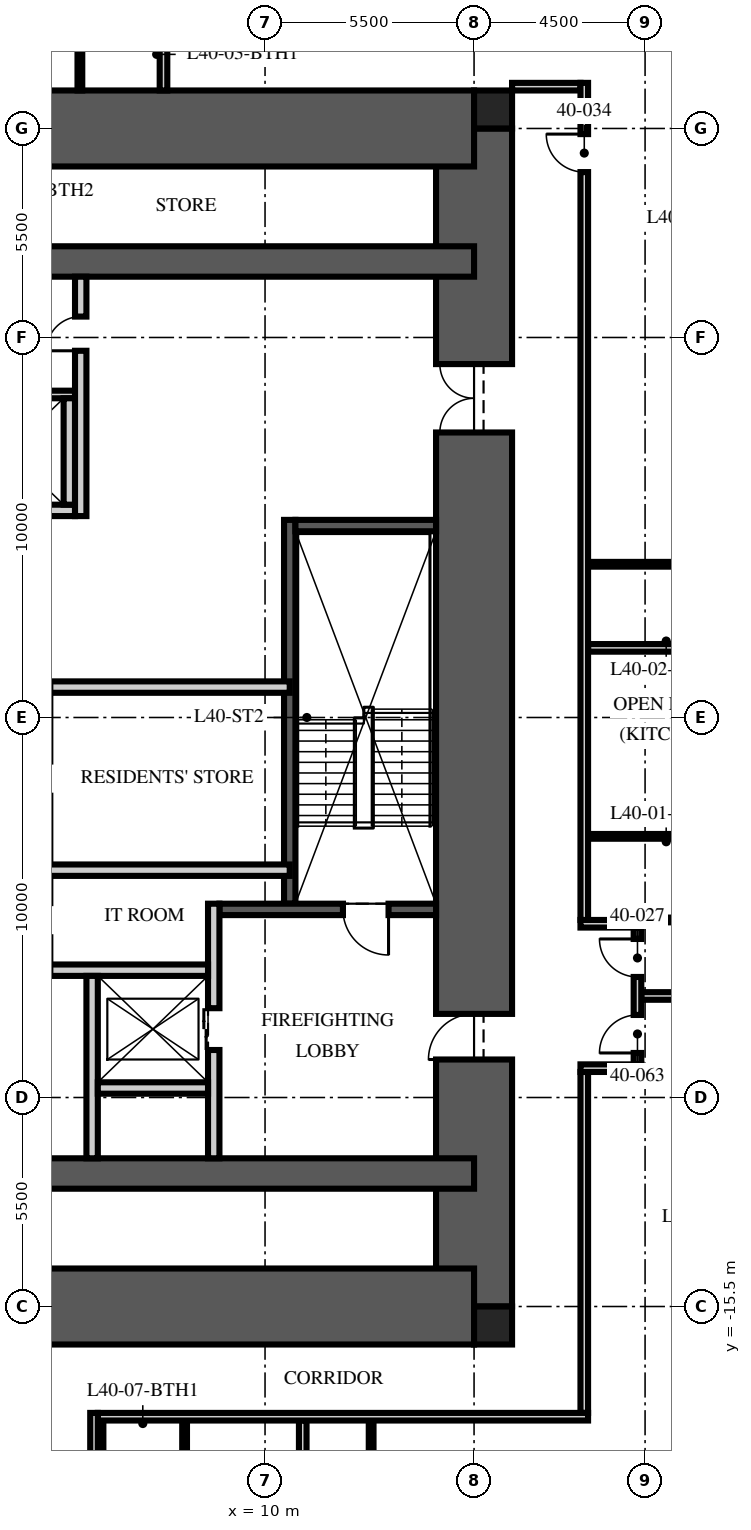
"""IFC4 building model, lengths in metres.
Left out: names, types, materials, properties, quantities, classifications, styles, units other than length and angle.
Written with IfcOpenShell. Run it as: python <this file> out.ifc"""

import sys

from ifc_helpers import new_model, si_unit, direction, frame, frame_2d, origin, origin_2d, place, context, subcontext, project, spatial, rectangle, extrude, element, fill, save


model = new_model("IFC4")
c1 = context("Model", 3, precision=1e-05, world=origin(), true_north=direction((0.0, 1.0)))
c2 = subcontext(c1, "Body", "Model", "MODEL_VIEW")
j1 = project(units=[si_unit("LENGTHUNIT", "METRE"), si_unit("PLANEANGLEUNIT", "RADIAN")], contexts=[c1])
p1 = place(None, origin())
s1 = spatial("IfcSite", under=j1, at=p1, CompositionType="ELEMENT")
p2 = place(p1, origin())
s2 = spatial("IfcBuilding", under=s1, at=p2, CompositionType="ELEMENT")
p3 = place(p2, frame((0.0, 0.0, 159.75)))
s3 = spatial("IfcBuildingStorey", under=s2, at=p3, CompositionType="ELEMENT", Elevation=159.75)
p4 = place(p3, frame((15.5, -15.5, -0.25), z_axis=(0.0, 0.0, 1.0), x_axis=(0.0, 1.0, 0.0)))
e1 = element("IfcWall", 1, at=p4, inside=s3, PredefinedType="SHEAR", context=c2, shape_type="SweptSolid", body=[
    extrude(rectangle(XDim=31.0, YDim=2.0, at=frame_2d((15.5, 0.0))), origin(), (0.0, 0.0, 1.0), 3.75),
])
p5 = place(p4, frame((6.5, 0.0, 0.25)))
e2 = element("IfcOpeningElement", 2, at=p5, cuts=e1, PredefinedType="OPENING", context=c2, shape_type="SweptSolid", body=[
    extrude(rectangle(XDim=1.2, YDim=2.1, at=frame_2d((0.6, 1.05))), frame((0.0, 1.01, 0.0), z_axis=(0.0, -1.0, 0.0), x_axis=(1.0, 0.0, 0.0)), (0.0, 0.0, 1.0), 2.02),
])
p6 = place(p4, frame((23.0, 0.0, 0.25)))
e3 = element("IfcOpeningElement", 3, at=p6, cuts=e1, PredefinedType="OPENING", context=c2, shape_type="SweptSolid", body=[
    extrude(rectangle(XDim=1.8, YDim=2.1, at=frame_2d((0.9, 1.05))), frame((0.0, 1.01, 0.0), z_axis=(0.0, -1.0, 0.0), x_axis=(1.0, 0.0, 0.0)), (0.0, 0.0, 1.0), 2.02),
])
p7 = place(p3, frame((-15.5, 15.5, -0.25), z_axis=(0.0, 0.0, 1.0), x_axis=(1.0, 0.0, 0.0)))
e4 = element("IfcWall", 4, at=p7, inside=s3, PredefinedType="SHEAR", context=c2, shape_type="SweptSolid", body=[
    extrude(rectangle(XDim=31.0, YDim=2.0, at=frame_2d((15.5, 0.0))), origin(), (0.0, 0.0, 1.0), 3.75),
])
p8 = place(p7, frame((5.0, 0.0, 0.25)))
e5 = element("IfcOpeningElement", 5, at=p8, cuts=e4, PredefinedType="OPENING", context=c2, shape_type="SweptSolid", body=[
    extrude(rectangle(XDim=1.0, YDim=2.1, at=frame_2d((0.5, 1.05))), frame((0.0, 1.01, 0.0), z_axis=(0.0, -1.0, 0.0), x_axis=(1.0, 0.0, 0.0)), (0.0, 0.0, 1.0), 2.02),
])
p9 = place(p3, frame((-15.5, -15.5, -0.25), z_axis=(0.0, 0.0, 1.0), x_axis=(1.0, 0.0, 0.0)))
e6 = element("IfcWall", 6, at=p9, inside=s3, PredefinedType="SHEAR", context=c2, shape_type="SweptSolid", body=[
    extrude(rectangle(XDim=31.0, YDim=2.0, at=frame_2d((15.5, 0.0))), origin(), (0.0, 0.0, 1.0), 3.75),
])
p10 = place(p9, frame((10.4, 0.0, 0.25)))
e7 = element("IfcOpeningElement", 7, at=p10, cuts=e6, PredefinedType="OPENING", context=c2, shape_type="SweptSolid", body=[
    extrude(rectangle(XDim=1.1, YDim=2.1, at=frame_2d((0.55, 1.05))), frame((0.0, 1.01, 0.0), z_axis=(0.0, -1.0, 0.0), x_axis=(1.0, 0.0, 0.0)), (0.0, 0.0, 1.0), 2.02),
])
p11 = place(p9, frame((13.5, 0.0, 0.25)))
e8 = element("IfcOpeningElement", 8, at=p11, cuts=e6, PredefinedType="OPENING", context=c2, shape_type="SweptSolid", body=[
    extrude(rectangle(XDim=1.1, YDim=2.1, at=frame_2d((0.55, 1.05))), frame((0.0, 1.01, 0.0), z_axis=(0.0, -1.0, 0.0), x_axis=(1.0, 0.0, 0.0)), (0.0, 0.0, 1.0), 2.02),
])
p12 = place(p9, frame((16.6, 0.0, 0.25)))
e9 = element("IfcOpeningElement", 9, at=p12, cuts=e6, PredefinedType="OPENING", context=c2, shape_type="SweptSolid", body=[
    extrude(rectangle(XDim=1.1, YDim=2.1, at=frame_2d((0.55, 1.05))), frame((0.0, 1.01, 0.0), z_axis=(0.0, -1.0, 0.0), x_axis=(1.0, 0.0, 0.0)), (0.0, 0.0, 1.0), 2.02),
])
for number, where, z_axis, x_axis in (
    (10, (-15.5, 12.0, -0.25), (0.0, 0.0, 1.0), (1.0, 0.0, 0.0)),
    (11, (-15.5, -12.0, -0.25), (0.0, 0.0, 1.0), (1.0, 0.0, 0.0)),
):
    element("IfcWall", number, at=place(p3, frame(where, z_axis=z_axis, x_axis=x_axis)), inside=s3, PredefinedType="SHEAR", context=c2, shape_type="SweptSolid", body=[
        extrude(rectangle(XDim=31.0, YDim=0.8, at=frame_2d((15.5, 0.0))), origin(), (0.0, 0.0, 1.0), 3.75),
    ])
for number, where, z_axis, x_axis in (
    (12, (16.0, 16.0, -0.25), (0.0, 0.0, 1.0), (1.0, 0.0, 0.0)),
    (13, (16.0, -16.0, -0.25), (0.0, 0.0, 1.0), (1.0, 0.0, 0.0)),
):
    element("IfcColumn", number, at=place(p3, frame(where, z_axis=z_axis, x_axis=x_axis)), inside=s3, PredefinedType="COLUMN", context=c2, shape_type="SweptSolid", body=[
        extrude(rectangle(XDim=1.0, YDim=1.0, at=origin_2d()), origin(), (0.0, 0.0, 1.0), 3.75),
    ])
p13 = place(p3, frame((10.65, -4.9, 0.0), z_axis=(0.0, 0.0, 1.0), x_axis=(0.0, 1.0, 0.0)))
e14 = element("IfcWall", 14, at=p13, inside=s3, PredefinedType="SOLIDWALL", context=c2, shape_type="SweptSolid", body=[
    extrude(rectangle(XDim=10.1, YDim=0.3, at=frame_2d((5.05, 0.0))), origin(), (0.0, 0.0, 1.0), 3.5),
])
p14 = place(p3, frame((14.5, -5.05, 0.0), z_axis=(0.0, 0.0, 1.0), x_axis=(-1.0, 0.0, 0.0)))
e15 = element("IfcWall", 15, at=p14, inside=s3, PredefinedType="SOLIDWALL", context=c2, shape_type="SweptSolid", body=[
    extrude(rectangle(XDim=5.7, YDim=0.3, at=frame_2d((2.85, 0.0))), origin(), (0.0, 0.0, 1.0), 3.5),
])
p15 = place(p14, frame((1.25, 0.0, 0.0)))
e16 = element("IfcOpeningElement", 16, at=p15, cuts=e15, PredefinedType="OPENING", context=c2, shape_type="SweptSolid", body=[
    extrude(rectangle(XDim=1.2, YDim=2.1, at=frame_2d((0.6, 1.05))), frame((0.0, 0.16, 0.0), z_axis=(0.0, -1.0, 0.0), x_axis=(1.0, 0.0, 0.0)), (0.0, 0.0, 1.0), 0.32),
])
p16 = place(p3, frame((14.5, 5.05, 0.0), z_axis=(0.0, 0.0, 1.0), x_axis=(-1.0, 0.0, 0.0)))
e17 = element("IfcWall", 17, at=p16, inside=s3, PredefinedType="SOLIDWALL", context=c2, shape_type="SweptSolid", body=[
    extrude(rectangle(XDim=3.7, YDim=0.3, at=frame_2d((1.85, 0.0))), origin(), (0.0, 0.0, 1.0), 3.5),
])
p17 = place(p3, frame((8.65, -11.6, 0.0), z_axis=(0.0, 0.0, 1.0), x_axis=(0.0, 1.0, 0.0)))
e18 = element("IfcWall", 18, at=p17, inside=s3, PredefinedType="PARTITIONING", context=c2, shape_type="SweptSolid", body=[
    extrude(rectangle(XDim=6.7, YDim=0.3, at=frame_2d((3.35, 0.0))), origin(), (0.0, 0.0, 1.0), 3.5),
])
p18 = place(p17, frame((2.85, 0.0, 0.0)))
e19 = element("IfcOpeningElement", 19, at=p18, cuts=e18, PredefinedType="OPENING", context=c2, shape_type="SweptSolid", body=[
    extrude(rectangle(XDim=1.1, YDim=2.1, at=frame_2d((0.55, 1.05))), frame((0.0, 0.16, 0.0), z_axis=(0.0, -1.0, 0.0), x_axis=(1.0, 0.0, 0.0)), (0.0, 0.0, 1.0), 0.32),
])
p19 = place(p3, frame((-8.5, -6.65, 0.0), z_axis=(0.0, 0.0, 1.0), x_axis=(1.0, 0.0, 0.0)))
e20 = element("IfcWall", 20, at=p19, inside=s3, PredefinedType="PARTITIONING", context=c2, shape_type="SweptSolid", body=[
    extrude(rectangle(XDim=17.0, YDim=0.3, at=frame_2d((8.5, 0.0))), origin(), (0.0, 0.0, 1.0), 3.5),
])
p20 = place(p19, frame((7.8, 0.0, 0.0)))
e21 = element("IfcOpeningElement", 21, at=p20, cuts=e20, PredefinedType="OPENING", context=c2, shape_type="SweptSolid", body=[
    extrude(rectangle(XDim=1.3, YDim=2.4, at=frame_2d((0.65, 1.2))), frame((0.0, 0.16, 0.0), z_axis=(0.0, -1.0, 0.0), x_axis=(1.0, 0.0, 0.0)), (0.0, 0.0, 1.0), 0.32),
])
p21 = place(p19, frame((5.65, 0.0, 0.0)))
e22 = element("IfcOpeningElement", 22, at=p21, cuts=e20, PredefinedType="OPENING", context=c2, shape_type="SweptSolid", body=[
    extrude(rectangle(XDim=0.9, YDim=2.1, at=frame_2d((0.45, 1.05))), frame((0.0, 0.16, 0.0), z_axis=(0.0, -1.0, 0.0), x_axis=(1.0, 0.0, 0.0)), (0.0, 0.0, 1.0), 0.32),
])
p22 = place(p19, frame((10.4, 0.0, 0.0)))
e23 = element("IfcOpeningElement", 23, at=p22, cuts=e20, PredefinedType="OPENING", context=c2, shape_type="SweptSolid", body=[
    extrude(rectangle(XDim=0.9, YDim=2.1, at=frame_2d((0.45, 1.05))), frame((0.0, 0.16, 0.0), z_axis=(0.0, -1.0, 0.0), x_axis=(1.0, 0.0, 0.0)), (0.0, 0.0, 1.0), 0.32),
])
p23 = place(p3, frame((5.45, -11.6, 0.0), z_axis=(0.0, 0.0, 1.0), x_axis=(0.0, 1.0, 0.0)))
e24 = element("IfcWall", 24, at=p23, inside=s3, PredefinedType="PARTITIONING", context=c2, shape_type="SweptSolid", body=[
    extrude(rectangle(XDim=4.8, YDim=0.3, at=frame_2d((2.4, 0.0))), origin(), (0.0, 0.0, 1.0), 3.5),
])
p24 = place(p3, frame((5.6, -9.75, 0.0), z_axis=(0.0, 0.0, 1.0), x_axis=(1.0, 0.0, 0.0)))
e25 = element("IfcWall", 25, at=p24, inside=s3, PredefinedType="PARTITIONING", context=c2, shape_type="SweptSolid", body=[
    extrude(rectangle(XDim=2.9, YDim=0.3, at=frame_2d((1.45, 0.0))), origin(), (0.0, 0.0, 1.0), 3.5),
])
p25 = place(p3, frame((-4.7, 5.45, 0.0), z_axis=(0.0, 0.0, 1.0), x_axis=(1.0, 0.0, 0.0)))
e26 = element("IfcWall", 26, at=p25, inside=s3, PredefinedType="PARTITIONING", context=c2, shape_type="SweptSolid", body=[
    extrude(rectangle(XDim=9.7, YDim=0.3, at=frame_2d((4.85, 0.0))), origin(), (0.0, 0.0, 1.0), 3.5),
])
p26 = place(p3, frame((-4.7, 8.5, 0.0), z_axis=(0.0, 0.0, 1.0), x_axis=(1.0, 0.0, 0.0)))
e27 = element("IfcWall", 27, at=p26, inside=s3, PredefinedType="PARTITIONING", context=c2, shape_type="SweptSolid", body=[
    extrude(rectangle(XDim=9.7, YDim=0.2, at=frame_2d((4.85, 0.0))), origin(), (0.0, 0.0, 1.0), 3.5),
])
p27 = place(p3, frame((4.85, 5.6, 0.0), z_axis=(0.0, 0.0, 1.0), x_axis=(0.0, 1.0, 0.0)))
e28 = element("IfcWall", 28, at=p27, inside=s3, PredefinedType="PARTITIONING", context=c2, shape_type="SweptSolid", body=[
    extrude(rectangle(XDim=2.8, YDim=0.3, at=frame_2d((1.4, 0.0))), origin(), (0.0, 0.0, 1.0), 3.5),
])
p28 = place(p3, frame((-10.65, 0.8, 0.0), z_axis=(0.0, 0.0, 1.0), x_axis=(1.0, 0.0, 0.0)))
e29 = element("IfcWall", 29, at=p28, inside=s3, PredefinedType="PARTITIONING", context=c2, shape_type="SweptSolid", body=[
    extrude(rectangle(XDim=21.3, YDim=0.3, at=frame_2d((10.65, 0.0))), origin(), (0.0, 0.0, 1.0), 3.5),
])
p29 = place(p28, frame((10.05, 0.0, 0.0)))
e30 = element("IfcOpeningElement", 30, at=p29, cuts=e29, PredefinedType="OPENING", context=c2, shape_type="SweptSolid", body=[
    extrude(rectangle(XDim=1.2, YDim=2.1, at=frame_2d((0.6, 1.05))), frame((0.0, 0.16, 0.0), z_axis=(0.0, -1.0, 0.0), x_axis=(1.0, 0.0, 0.0)), (0.0, 0.0, 1.0), 0.32),
])
p30 = place(p28, frame((0.793, 0.0, 0.0)))
e31 = element("IfcOpeningElement", 31, at=p30, cuts=e29, PredefinedType="OPENING", context=c2, shape_type="SweptSolid", body=[
    extrude(rectangle(XDim=0.9, YDim=2.1, at=frame_2d((0.45, 1.05))), frame((0.0, 0.16, 0.0), z_axis=(0.0, -1.0, 0.0), x_axis=(1.0, 0.0, 0.0)), (0.0, 0.0, 1.0), 0.32),
])
p31 = place(p3, frame((10.65, -4.018, 0.0), z_axis=(0.0, 0.0, 1.0), x_axis=(-1.0, 0.0, 0.0)))
e32 = element("IfcWall", 32, at=p31, inside=s3, PredefinedType="PARTITIONING", context=c2, shape_type="SweptSolid", body=[
    extrude(rectangle(XDim=6.45, YDim=0.3, at=frame_2d((3.225, 0.0))), origin(), (0.0, 0.0, 1.0), 3.5),
])
p32 = place(p3, frame((5.15, 5.3, 0.0), z_axis=(0.0, 0.0, 1.0), x_axis=(0.0, 1.0, 0.0)))
e33 = element("IfcWall", 33, at=p32, inside=s3, PredefinedType="PARTITIONING", context=c2, shape_type="SweptSolid", body=[
    extrude(rectangle(XDim=6.3, YDim=0.3, at=frame_2d((3.15, 0.0))), origin(), (0.0, 0.0, 1.0), 3.5),
])
p33 = place(p32, frame((4.35, 0.0, 0.0)))
e34 = element("IfcOpeningElement", 34, at=p33, cuts=e33, PredefinedType="OPENING", context=c2, shape_type="SweptSolid", body=[
    extrude(rectangle(XDim=0.9, YDim=2.1, at=frame_2d((0.45, 1.05))), frame((0.0, 0.16, 0.0), z_axis=(0.0, -1.0, 0.0), x_axis=(1.0, 0.0, 0.0)), (0.0, 0.0, 1.0), 0.32),
])
p34 = place(p3, frame((16.5, 16.6, 0.0), z_axis=(0.0, 0.0, 1.0), x_axis=(1.0, 0.0, 0.0)))
e35 = element("IfcWall", 35, at=p34, inside=s3, PredefinedType="PARTITIONING", context=c2, shape_type="SweptSolid", body=[
    extrude(rectangle(XDim=1.8, YDim=0.2, at=frame_2d((0.9, 0.0))), origin(), (0.0, 0.0, 1.0), 2.3),
])
p35 = place(p3, frame((19.9, -7.328, 0.0), z_axis=(0.0, 0.0, 1.0), x_axis=(1.0, 0.0, 0.0)))
e36 = element("IfcWall", 36, at=p35, inside=s3, PredefinedType="PARTITIONING", context=c2, shape_type="SweptSolid", body=[
    extrude(rectangle(XDim=8.5, YDim=0.2, at=frame_2d((4.25, 0.0))), origin(), (0.0, 0.0, 1.0), 2.81),
])
p36 = place(p3, frame((18.5, 1.832, 0.0), z_axis=(0.0, 0.0, 1.0), x_axis=(1.0, 0.0, 0.0)))
e37 = element("IfcWall", 37, at=p36, inside=s3, PredefinedType="PARTITIONING", context=c2, shape_type="SweptSolid", body=[
    extrude(rectangle(XDim=9.9, YDim=0.2, at=frame_2d((4.95, 0.0))), origin(), (0.0, 0.0, 1.0), 2.81),
])
p37 = place(p3, frame((7.328, 16.5, 0.0), z_axis=(0.0, 0.0, 1.0), x_axis=(0.0, 1.0, 0.0)))
e38 = element("IfcWall", 38, at=p37, inside=s3, PredefinedType="PARTITIONING", context=c2, shape_type="SweptSolid", body=[
    extrude(rectangle(XDim=11.9, YDim=0.2, at=frame_2d((5.95, 0.0))), origin(), (0.0, 0.0, 1.0), 2.81),
])
p38 = place(p3, frame((10.992, -18.5, 0.0), z_axis=(0.0, 0.0, 1.0), x_axis=(0.0, -1.0, 0.0)))
e39 = element("IfcWall", 39, at=p38, inside=s3, PredefinedType="PARTITIONING", context=c2, shape_type="SweptSolid", body=[
    extrude(rectangle(XDim=9.9, YDim=0.2, at=frame_2d((4.95, 0.0))), origin(), (0.0, 0.0, 1.0), 2.81),
])
p39 = place(p3, frame((19.97, -5.328, 0.0), z_axis=(0.0, 0.0, 1.0), x_axis=(1.0, 0.0, 0.0)))
e40 = element("IfcWall", 40, at=p39, inside=s3, PredefinedType="PARTITIONING", context=c2, shape_type="SweptSolid", body=[
    extrude(rectangle(XDim=2.31, YDim=0.125, at=frame_2d((1.155, 0.0))), origin(), (0.0, 0.0, 1.0), 3.5),
])
for number, where, z_axis, x_axis in (
    (41, (18.5, -3.128, 0.0), (0.0, 0.0, 1.0), (1.0, 0.0, 0.0)),
    (42, (18.5, 4.032, 0.0), (0.0, 0.0, 1.0), (1.0, 0.0, 0.0)),
):
    element("IfcWall", number, at=place(p3, frame(where, z_axis=z_axis, x_axis=x_axis)), inside=s3, PredefinedType="PARTITIONING", context=c2, shape_type="SweptSolid", body=[
        extrude(rectangle(XDim=3.78, YDim=0.125, at=frame_2d((1.89, 0.0))), origin(), (0.0, 0.0, 1.0), 3.5),
    ])
p40 = place(p3, frame((5.128, 16.5, 0.0), z_axis=(0.0, 0.0, 1.0), x_axis=(0.0, 1.0, 0.0)))
e43 = element("IfcWall", 43, at=p40, inside=s3, PredefinedType="PARTITIONING", context=c2, shape_type="SweptSolid", body=[
    extrude(rectangle(XDim=2.8, YDim=0.125, at=frame_2d((1.4, 0.0))), origin(), (0.0, 0.0, 1.0), 3.5),
])
for number, where, z_axis, x_axis in (
    (44, (5.684, -18.5, 0.0), (0.0, 0.0, 1.0), (0.0, -1.0, 0.0)),
    (45, (7.884, -18.5, 0.0), (0.0, 0.0, 1.0), (0.0, -1.0, 0.0)),
    (46, (12.792, -18.5, 0.0), (0.0, 0.0, 1.0), (0.0, -1.0, 0.0)),
):
    element("IfcWall", number, at=place(p3, frame(where, z_axis=z_axis, x_axis=x_axis)), inside=s3, PredefinedType="PARTITIONING", context=c2, shape_type="SweptSolid", body=[
        extrude(rectangle(XDim=3.78, YDim=0.125, at=frame_2d((1.89, 0.0))), origin(), (0.0, 0.0, 1.0), 3.5),
    ])
p41 = place(p3, frame((18.4, -18.3, 0.0), z_axis=(0.0, 0.0, 1.0), x_axis=(0.0, 1.0, 0.0)))
e47 = element("IfcWall", 47, at=p41, inside=s3, PredefinedType="PARTITIONING", context=c2, shape_type="SweptSolid", body=[
    extrude(rectangle(XDim=8.972, YDim=0.2, at=frame_2d((4.486, 0.0))), origin(), (0.0, 0.0, 1.0), 2.3),
])
p42 = place(p3, frame((18.3, -9.228, 0.0), z_axis=(0.0, 0.0, 1.0), x_axis=(1.0, 0.0, 0.0)))
e48 = element("IfcWall", 48, at=p42, inside=s3, PredefinedType="PARTITIONING", context=c2, shape_type="SweptSolid", body=[
    extrude(rectangle(XDim=1.6, YDim=0.2, at=frame_2d((0.8, 0.0))), origin(), (0.0, 0.0, 1.0), 2.7),
])
p43 = place(p3, frame((18.3, -5.428, 0.0), z_axis=(0.0, 0.0, 1.0), x_axis=(1.0, 0.0, 0.0)))
e49 = element("IfcWall", 49, at=p43, inside=s3, PredefinedType="PARTITIONING", context=c2, shape_type="SweptSolid", body=[
    extrude(rectangle(XDim=1.6, YDim=0.2, at=frame_2d((0.8, 0.0))), origin(), (0.0, 0.0, 1.0), 3.5),
])
p44 = place(p3, frame((19.8, -9.128, 0.0), z_axis=(0.0, 0.0, 1.0), x_axis=(0.0, 1.0, 0.0)))
e50 = element("IfcWall", 50, at=p44, inside=s3, PredefinedType="PARTITIONING", context=c2, shape_type="SweptSolid", body=[
    extrude(rectangle(XDim=3.6, YDim=0.2, at=frame_2d((1.8, 0.0))), origin(), (0.0, 0.0, 1.0), 2.7),
])
p45 = place(p44, frame((2.3, 0.0, 0.0)))
e51 = element("IfcOpeningElement", 51, at=p45, cuts=e50, PredefinedType="OPENING", context=c2, shape_type="SweptSolid", body=[
    extrude(rectangle(XDim=1.0, YDim=2.2, at=frame_2d((0.5, 1.1))), frame((0.0, 0.11, 0.0), z_axis=(0.0, -1.0, 0.0), x_axis=(1.0, 0.0, 0.0)), (0.0, 0.0, 1.0), 0.22),
])
p46 = place(p44, frame((0.3, 0.0, 0.0)))
e52 = element("IfcOpeningElement", 52, at=p46, cuts=e50, PredefinedType="OPENING", context=c2, shape_type="SweptSolid", body=[
    extrude(rectangle(XDim=1.0, YDim=2.2, at=frame_2d((0.5, 1.1))), frame((0.0, 0.11, 0.0), z_axis=(0.0, -1.0, 0.0), x_axis=(1.0, 0.0, 0.0)), (0.0, 0.0, 1.0), 0.22),
])
p47 = place(p3, frame((18.4, -5.328, 0.0), z_axis=(0.0, 0.0, 1.0), x_axis=(0.0, 1.0, 0.0)))
e53 = element("IfcWall", 53, at=p47, inside=s3, PredefinedType="PARTITIONING", context=c2, shape_type="SweptSolid", body=[
    extrude(rectangle(XDim=22.028, YDim=0.2, at=frame_2d((11.014, 0.0))), origin(), (0.0, 0.0, 1.0), 2.7),
])
p48 = place(p47, frame((19.68, 0.0, 0.0)))
e54 = element("IfcOpeningElement", 54, at=p48, cuts=e53, PredefinedType="OPENING", context=c2, shape_type="SweptSolid", body=[
    extrude(rectangle(XDim=1.0, YDim=2.2, at=frame_2d((0.5, 1.1))), frame((0.0, 0.11, 0.0), z_axis=(0.0, -1.0, 0.0), x_axis=(1.0, 0.0, 0.0)), (0.0, 0.0, 1.0), 0.22),
])
p49 = place(p3, frame((18.5, -18.4, 0.0), z_axis=(0.0, 0.0, 1.0), x_axis=(-1.0, 0.0, 0.0)))
e55 = element("IfcWall", 55, at=p49, inside=s3, PredefinedType="PARTITIONING", context=c2, shape_type="SweptSolid", body=[
    extrude(rectangle(XDim=12.9, YDim=0.2, at=frame_2d((6.45, 0.0))), origin(), (0.0, 0.0, 1.0), 2.3),
])
p50 = place(p3, frame((5.5, -18.3, 0.0), z_axis=(0.0, 0.0, 1.0), x_axis=(0.0, -1.0, 0.0)))
e56 = element("IfcWall", 56, at=p50, inside=s3, PredefinedType="PARTITIONING", context=c2, shape_type="SweptSolid", body=[
    extrude(rectangle(XDim=3.0, YDim=0.2, at=frame_2d((1.5, 0.0))), origin(), (0.0, 0.0, 1.0), 3.5),
])
p51 = place(p15, origin())
e57 = element("IfcDoor", 57, at=p51, inside=s3, OperationType="SINGLE_SWING_LEFT", PredefinedType="DOOR", context=c2, shape_type="SweptSolid", body=[
    extrude(rectangle(XDim=1.2, YDim=2.1, at=frame_2d((0.6, 1.05))), frame((0.0, 0.025, 0.0), z_axis=(0.0, -1.0, 0.0), x_axis=(1.0, 0.0, 0.0)), (0.0, 0.0, 1.0), 0.05),
])
fill(e16, e57)
p52 = place(p5, origin())
e58 = element("IfcDoor", 58, at=p52, inside=s3, OperationType="SINGLE_SWING_LEFT", PredefinedType="DOOR", context=c2, shape_type="SweptSolid", body=[
    extrude(rectangle(XDim=1.2, YDim=2.1, at=frame_2d((0.6, 1.05))), frame((0.0, 0.025, 0.0), z_axis=(0.0, -1.0, 0.0), x_axis=(1.0, 0.0, 0.0)), (0.0, 0.0, 1.0), 0.05),
])
fill(e2, e58)
p53 = place(p6, origin())
e59 = element("IfcDoor", 59, at=p53, inside=s3, OperationType="DOUBLE_DOOR_SINGLE_SWING", PredefinedType="DOOR", context=c2, shape_type="SweptSolid", body=[
    extrude(rectangle(XDim=1.8, YDim=2.1, at=frame_2d((0.9, 1.05))), frame((0.0, 0.025, 0.0), z_axis=(0.0, -1.0, 0.0), x_axis=(1.0, 0.0, 0.0)), (0.0, 0.0, 1.0), 0.05),
])
fill(e3, e59)
p54 = place(p18, origin())
e60 = element("IfcDoor", 60, at=p54, inside=s3, OperationType="DOUBLE_DOOR_SLIDING", PredefinedType="DOOR", context=c2, shape_type="SweptSolid", body=[
    extrude(rectangle(XDim=1.1, YDim=2.1, at=frame_2d((0.55, 1.05))), frame((0.0, 0.025, 0.0), z_axis=(0.0, -1.0, 0.0), x_axis=(1.0, 0.0, 0.0)), (0.0, 0.0, 1.0), 0.05),
])
fill(e19, e60)
p55 = place(p33, origin())
e61 = element("IfcDoor", 61, at=p55, inside=s3, OperationType="SINGLE_SWING_LEFT", PredefinedType="DOOR", context=c2, shape_type="SweptSolid", body=[
    extrude(rectangle(XDim=0.9, YDim=2.1, at=frame_2d((0.45, 1.05))), frame((0.0, 0.025, 0.0), z_axis=(0.0, -1.0, 0.0), x_axis=(1.0, 0.0, 0.0)), (0.0, 0.0, 1.0), 0.05),
])
fill(e34, e61)
p56 = place(p45, origin())
e62 = element("IfcDoor", 62, at=p56, inside=s3, OperationType="SINGLE_SWING_RIGHT", PredefinedType="DOOR", context=c2, shape_type="SweptSolid", body=[
    extrude(rectangle(XDim=1.0, YDim=2.2, at=frame_2d((0.5, 1.1))), frame((0.0, 0.025, 0.0), z_axis=(0.0, -1.0, 0.0), x_axis=(1.0, 0.0, 0.0)), (0.0, 0.0, 1.0), 0.05),
])
fill(e51, e62)
p57 = place(p48, origin())
e63 = element("IfcDoor", 63, at=p57, inside=s3, OperationType="SINGLE_SWING_RIGHT", PredefinedType="DOOR", context=c2, shape_type="SweptSolid", body=[
    extrude(rectangle(XDim=1.0, YDim=2.2, at=frame_2d((0.5, 1.1))), frame((0.0, 0.025, 0.0), z_axis=(0.0, -1.0, 0.0), x_axis=(1.0, 0.0, 0.0)), (0.0, 0.0, 1.0), 0.05),
])
fill(e54, e63)
p58 = place(p46, origin())
e64 = element("IfcDoor", 64, at=p58, inside=s3, OperationType="SINGLE_SWING_LEFT", PredefinedType="DOOR", context=c2, shape_type="SweptSolid", body=[
    extrude(rectangle(XDim=1.0, YDim=2.2, at=frame_2d((0.5, 1.1))), frame((0.0, 0.025, 0.0), z_axis=(0.0, -1.0, 0.0), x_axis=(1.0, 0.0, 0.0)), (0.0, 0.0, 1.0), 0.05),
])
fill(e52, e64)
save(model, sys.argv[1])
